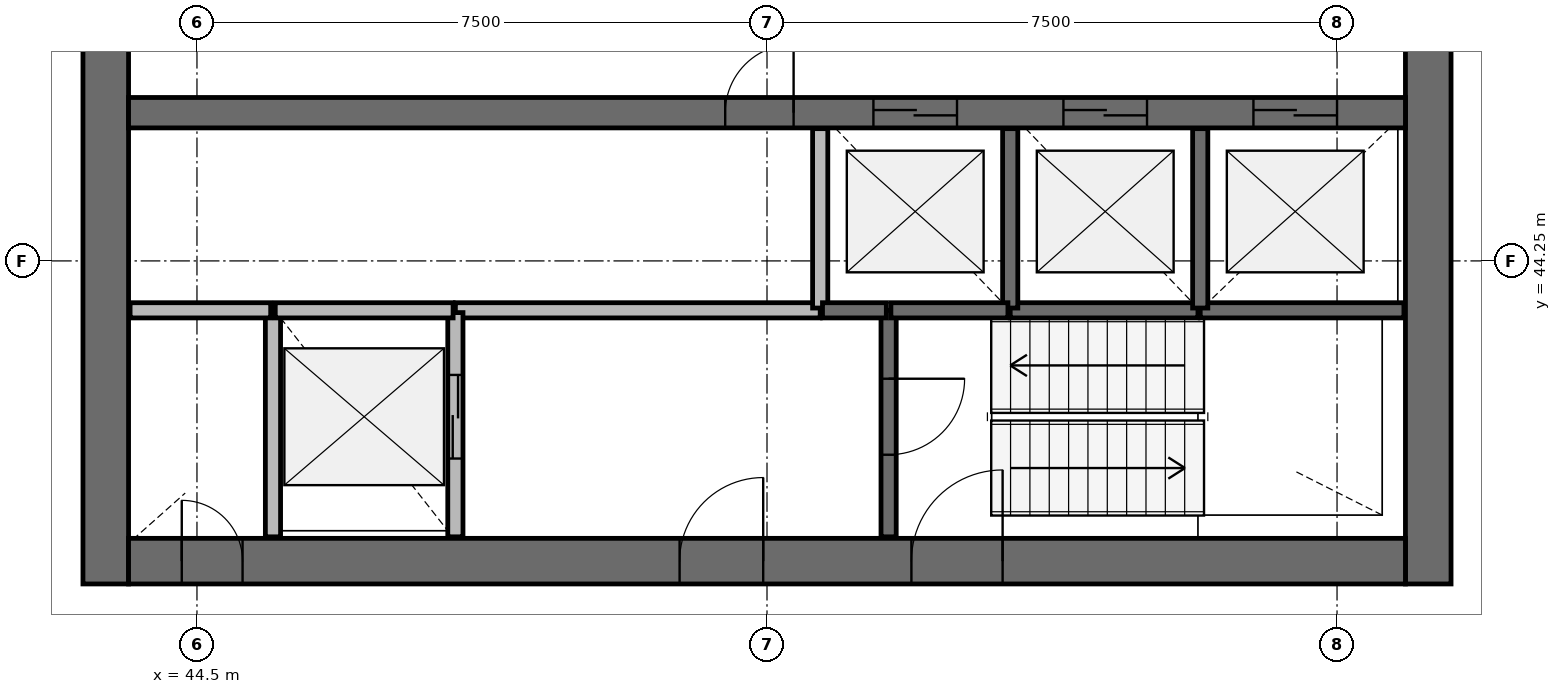
"""IFC4 building model, lengths in metres.
Left out: names, types, materials, properties, quantities, classifications, styles, units other than length and angle.
Written with IfcOpenShell. Run it as: python <this file> out.ifc"""

import sys

from ifc_helpers import new_model, si_unit, direction, frame, frame_2d, origin, place, context, subcontext, project, spatial, rectangle, extrude, source, transform, mapped, element, fill, save


model = new_model("IFC4")
c1 = context("Model", 3, precision=1e-05, world=origin(), true_north=direction((0.0, 1.0)))
c2 = subcontext(c1, "Body", "Model", "MODEL_VIEW")
j1 = project(units=[si_unit("LENGTHUNIT", "METRE"), si_unit("PLANEANGLEUNIT", "RADIAN")], contexts=[c1])
p1 = place(None, origin())
s1 = spatial("IfcSite", under=j1, at=p1, CompositionType="ELEMENT")
p2 = place(p1, origin())
s2 = spatial("IfcBuilding", under=s1, at=p2, CompositionType="ELEMENT")
p3 = place(p2, frame((0.0, 0.0, 257.9)))
s3 = spatial("IfcBuildingStorey", under=s2, at=p3, CompositionType="ELEMENT", Elevation=257.9)
p4 = place(p3, frame((60.7, 40.0, 0.0), z_axis=(0.0, 0.0, 1.0), x_axis=(0.0, 1.0, 0.0)))
e1 = element("IfcWall", 1, at=p4, inside=s3, PredefinedType="SHEAR", context=c2, shape_type="SweptSolid", body=[
    extrude(rectangle(XDim=16.0, YDim=0.6, at=frame_2d((8.0, 0.0))), origin(), (0.0, 0.0, 1.0), 3.9),
])
p5 = place(p4, frame((7.1, 0.0, 0.0)))
e2 = element("IfcOpeningElement", 2, at=p5, cuts=e1, PredefinedType="OPENING", context=c2, shape_type="SweptSolid", body=[
    extrude(rectangle(XDim=1.8, YDim=2.1, at=frame_2d((0.9, 1.05))), frame((0.0, 0.31, 0.0), z_axis=(0.0, -1.0, 0.0), x_axis=(1.0, 0.0, 0.0)), (0.0, 0.0, 1.0), 0.62),
])
p6 = place(p3, frame((43.3, 56.0, 0.0), z_axis=(0.0, 0.0, 1.0), x_axis=(0.0, -1.0, 0.0)))
e3 = element("IfcWall", 3, at=p6, inside=s3, PredefinedType="SHEAR", context=c2, shape_type="SweptSolid", body=[
    extrude(rectangle(XDim=16.0, YDim=0.6, at=frame_2d((8.0, 0.0))), origin(), (0.0, 0.0, 1.0), 3.9),
])
p7 = place(p6, frame((7.1, 0.0, 0.0)))
e4 = element("IfcOpeningElement", 4, at=p7, cuts=e3, PredefinedType="OPENING", context=c2, shape_type="SweptSolid", body=[
    extrude(rectangle(XDim=1.8, YDim=2.1, at=frame_2d((0.9, 1.05))), frame((0.0, 0.31, 0.0), z_axis=(0.0, -1.0, 0.0), x_axis=(1.0, 0.0, 0.0)), (0.0, 0.0, 1.0), 0.62),
])
p8 = place(p3, frame((43.6, 40.3, 0.0), z_axis=(0.0, 0.0, 1.0), x_axis=(1.0, 0.0, 0.0)))
e5 = element("IfcWall", 5, at=p8, inside=s3, PredefinedType="SHEAR", context=c2, shape_type="SweptSolid", body=[
    extrude(rectangle(XDim=16.8, YDim=0.6, at=frame_2d((8.4, 0.0))), origin(), (0.0, 0.0, 1.0), 3.9),
])
p9 = place(p8, frame((10.3, 0.0, 0.0)))
e6 = element("IfcOpeningElement", 6, at=p9, cuts=e5, PredefinedType="OPENING", context=c2, shape_type="SweptSolid", body=[
    extrude(rectangle(XDim=1.2, YDim=2.1, at=frame_2d((0.6, 1.05))), frame((0.0, 0.31, 0.0), z_axis=(0.0, -1.0, 0.0), x_axis=(1.0, 0.0, 0.0)), (0.0, 0.0, 1.0), 0.62),
])
p10 = place(p8, frame((7.25, 0.0, 0.0)))
e7 = element("IfcOpeningElement", 7, at=p10, cuts=e5, PredefinedType="OPENING", context=c2, shape_type="SweptSolid", body=[
    extrude(rectangle(XDim=1.1, YDim=2.1, at=frame_2d((0.55, 1.05))), frame((0.0, 0.31, 0.0), z_axis=(0.0, -1.0, 0.0), x_axis=(1.0, 0.0, 0.0)), (0.0, 0.0, 1.0), 0.62),
])
p11 = place(p8, frame((0.7, 0.0, 0.0)))
e8 = element("IfcOpeningElement", 8, at=p11, cuts=e5, PredefinedType="OPENING", context=c2, shape_type="SweptSolid", body=[
    extrude(rectangle(XDim=0.8, YDim=2.1, at=frame_2d((0.4, 1.05))), frame((0.0, 0.31, 0.0), z_axis=(0.0, -1.0, 0.0), x_axis=(1.0, 0.0, 0.0)), (0.0, 0.0, 1.0), 0.62),
])
p12 = place(p3, frame((43.6, 46.2, 0.0), z_axis=(0.0, 0.0, 1.0), x_axis=(1.0, 0.0, 0.0)))
e9 = element("IfcWall", 9, at=p12, inside=s3, PredefinedType="SHEAR", context=c2, shape_type="SweptSolid", body=[
    extrude(rectangle(XDim=16.8, YDim=0.4, at=frame_2d((8.4, 0.0))), origin(), (0.0, 0.0, 1.0), 3.9),
])
p13 = place(p12, frame((9.8, 0.0, 0.0)))
e10 = element("IfcOpeningElement", 10, at=p13, cuts=e9, PredefinedType="OPENING", context=c2, shape_type="SweptSolid", body=[
    extrude(rectangle(XDim=1.1, YDim=2.1, at=frame_2d((0.55, 1.05))), frame((0.0, 0.21, 0.0), z_axis=(0.0, -1.0, 0.0), x_axis=(1.0, 0.0, 0.0)), (0.0, 0.0, 1.0), 0.42),
])
p14 = place(p12, frame((12.3, 0.0, 0.0)))
e11 = element("IfcOpeningElement", 11, at=p14, cuts=e9, PredefinedType="OPENING", context=c2, shape_type="SweptSolid", body=[
    extrude(rectangle(XDim=1.1, YDim=2.1, at=frame_2d((0.55, 1.05))), frame((0.0, 0.21, 0.0), z_axis=(0.0, -1.0, 0.0), x_axis=(1.0, 0.0, 0.0)), (0.0, 0.0, 1.0), 0.42),
])
p15 = place(p12, frame((14.8, 0.0, 0.0)))
e12 = element("IfcOpeningElement", 12, at=p15, cuts=e9, PredefinedType="OPENING", context=c2, shape_type="SweptSolid", body=[
    extrude(rectangle(XDim=1.1, YDim=2.1, at=frame_2d((0.55, 1.05))), frame((0.0, 0.21, 0.0), z_axis=(0.0, -1.0, 0.0), x_axis=(1.0, 0.0, 0.0)), (0.0, 0.0, 1.0), 0.42),
])
p16 = place(p12, frame((7.85, 0.0, 0.0)))
e13 = element("IfcOpeningElement", 13, at=p16, cuts=e9, PredefinedType="OPENING", context=c2, shape_type="SweptSolid", body=[
    extrude(rectangle(XDim=0.9, YDim=2.1, at=frame_2d((0.45, 1.05))), frame((0.0, 0.21, 0.0), z_axis=(0.0, -1.0, 0.0), x_axis=(1.0, 0.0, 0.0)), (0.0, 0.0, 1.0), 0.42),
])
p17 = place(p3, frame((52.7, 43.6, 0.0), z_axis=(0.0, 0.0, 1.0), x_axis=(-1.0, 0.0, 0.0)))
e14 = element("IfcWall", 14, at=p17, inside=s3, PredefinedType="SOLIDWALL", context=c2, shape_type="SweptSolid", body=[
    extrude(rectangle(XDim=4.8, YDim=0.2, at=frame_2d((2.4, 0.0))), origin(), (0.0, 0.0, 1.0), 3.58),
])
p18 = place(p3, frame((45.5, 43.6, 0.0), z_axis=(0.0, 0.0, 1.0), x_axis=(0.0, -1.0, 0.0)))
e15 = element("IfcWall", 15, at=p18, inside=s3, PredefinedType="SOLIDWALL", context=c2, shape_type="SweptSolid", body=[
    extrude(rectangle(XDim=2.98, YDim=0.2, at=frame_2d((1.49, 0.0))), origin(), (0.0, 0.0, 1.0), 3.58),
])
p19 = place(p3, frame((47.9, 40.62, 0.0), z_axis=(0.0, 0.0, 1.0), x_axis=(0.0, 1.0, 0.0)))
e16 = element("IfcWall", 16, at=p19, inside=s3, PredefinedType="SOLIDWALL", context=c2, shape_type="SweptSolid", body=[
    extrude(rectangle(XDim=2.95, YDim=0.2, at=frame_2d((1.475, 0.0))), origin(), (0.0, 0.0, 1.0), 3.58),
])
p20 = place(p19, frame((1.03, 0.0, 0.0)))
e17 = element("IfcOpeningElement", 17, at=p20, cuts=e16, PredefinedType="OPENING", context=c2, shape_type="SweptSolid", body=[
    extrude(rectangle(XDim=1.1, YDim=2.1, at=frame_2d((0.55, 1.05))), frame((0.0, 0.11, 0.0), z_axis=(0.0, -1.0, 0.0), x_axis=(1.0, 0.0, 0.0)), (0.0, 0.0, 1.0), 0.22),
])
p21 = place(p3, frame((53.6, 43.6, 0.0), z_axis=(0.0, 0.0, 1.0), x_axis=(0.0, -1.0, 0.0)))
e18 = element("IfcWall", 18, at=p21, inside=s3, PredefinedType="SOLIDWALL", context=c2, shape_type="SweptSolid", body=[
    extrude(rectangle(XDim=2.98, YDim=0.2, at=frame_2d((1.49, 0.0))), origin(), (0.0, 0.0, 1.0), 3.58),
])
p22 = place(p21, frame((0.9, 0.0, 0.0)))
e19 = element("IfcOpeningElement", 19, at=p22, cuts=e18, PredefinedType="OPENING", context=c2, shape_type="SweptSolid", body=[
    extrude(rectangle(XDim=1.0, YDim=2.1, at=frame_2d((0.5, 1.05))), frame((0.0, 0.11, 0.0), z_axis=(0.0, -1.0, 0.0), x_axis=(1.0, 0.0, 0.0)), (0.0, 0.0, 1.0), 0.22),
])
p23 = place(p3, frame((57.7, 43.6, 0.0), z_axis=(0.0, 0.0, 1.0), x_axis=(1.0, 0.0, 0.0)))
e20 = element("IfcWall", 20, at=p23, inside=s3, PredefinedType="SOLIDWALL", context=c2, shape_type="SweptSolid", body=[
    extrude(rectangle(XDim=2.68, YDim=0.2, at=frame_2d((1.34, 0.0))), origin(), (0.0, 0.0, 1.0), 3.58),
])
p24 = place(p3, frame((55.2, 43.6, 0.0), z_axis=(0.0, 0.0, 1.0), x_axis=(1.0, 0.0, 0.0)))
e21 = element("IfcWall", 21, at=p24, inside=s3, PredefinedType="SOLIDWALL", context=c2, shape_type="SweptSolid", body=[
    extrude(rectangle(XDim=2.47, YDim=0.2, at=frame_2d((1.235, 0.0))), origin(), (0.0, 0.0, 1.0), 3.58),
])
p25 = place(p3, frame((47.87, 43.6, 0.0), z_axis=(0.0, 0.0, 1.0), x_axis=(-1.0, 0.0, 0.0)))
e22 = element("IfcWall", 22, at=p25, inside=s3, PredefinedType="SOLIDWALL", context=c2, shape_type="SweptSolid", body=[
    extrude(rectangle(XDim=2.34, YDim=0.2, at=frame_2d((1.17, 0.0))), origin(), (0.0, 0.0, 1.0), 3.58),
])
for number, where, z_axis, x_axis in (
    (23, (52.7, 45.99, 0.0), (0.0, 0.0, 1.0), (0.0, -1.0, 0.0)),
    (24, (55.2, 43.63, 0.0), (0.0, 0.0, 1.0), (0.0, 1.0, 0.0)),
    (25, (57.7, 43.63, 0.0), (0.0, 0.0, 1.0), (0.0, 1.0, 0.0)),
):
    element("IfcWall", number, at=place(p3, frame(where, z_axis=z_axis, x_axis=x_axis)), inside=s3, PredefinedType="SOLIDWALL", context=c2, shape_type="SweptSolid", body=[
        extrude(rectangle(XDim=2.36, YDim=0.2, at=frame_2d((1.18, 0.0))), origin(), (0.0, 0.0, 1.0), 3.58),
    ])
p26 = place(p3, frame((45.47, 43.6, 0.0), z_axis=(0.0, 0.0, 1.0), x_axis=(-1.0, 0.0, 0.0)))
e26 = element("IfcWall", 26, at=p26, inside=s3, PredefinedType="SOLIDWALL", context=c2, shape_type="SweptSolid", body=[
    extrude(rectangle(XDim=1.85, YDim=0.2, at=frame_2d((0.925, 0.0))), origin(), (0.0, 0.0, 1.0), 3.58),
])
p27 = place(p3, frame((53.63, 43.6, 0.0), z_axis=(0.0, 0.0, 1.0), x_axis=(1.0, 0.0, 0.0)))
e27 = element("IfcWall", 27, at=p27, inside=s3, PredefinedType="SOLIDWALL", context=c2, shape_type="SweptSolid", body=[
    extrude(rectangle(XDim=1.54, YDim=0.2, at=frame_2d((0.77, 0.0))), origin(), (0.0, 0.0, 1.0), 3.58),
])
p28 = place(p3, frame((52.73, 43.6, 0.0), z_axis=(0.0, 0.0, 1.0), x_axis=(1.0, 0.0, 0.0)))
e28 = element("IfcWall", 28, at=p28, inside=s3, PredefinedType="SOLIDWALL", context=c2, shape_type="SweptSolid", body=[
    extrude(rectangle(XDim=0.84, YDim=0.2, at=frame_2d((0.42, 0.0))), origin(), (0.0, 0.0, 1.0), 3.58),
])
m1 = source(origin(), c2, "Body", "SweptSolid", [
    extrude(rectangle(XDim=1.1, YDim=2.1, at=frame_2d((0.55, 1.05))), frame((0.0, 0.025, 0.0), z_axis=(0.0, -1.0, 0.0), x_axis=(1.0, 0.0, 0.0)), (0.0, 0.0, 1.0), 0.05),
])
p29 = place(p13, origin())
e29 = element("IfcDoor", 29, at=p29, inside=s3, OperationType="DOUBLE_DOOR_SLIDING", PredefinedType="USERDEFINED", context=c2, shape_type="MappedRepresentation", body=[
    mapped(m1, transform((0.0, 0.0, 0.0), scale=1.0)),
])
fill(e10, e29)
p30 = place(p14, origin())
e30 = element("IfcDoor", 30, at=p30, inside=s3, OperationType="DOUBLE_DOOR_SLIDING", PredefinedType="USERDEFINED", context=c2, shape_type="MappedRepresentation", body=[
    mapped(m1, transform((0.0, 0.0, 0.0), scale=1.0)),
])
fill(e11, e30)
p31 = place(p15, origin())
e31 = element("IfcDoor", 31, at=p31, inside=s3, OperationType="DOUBLE_DOOR_SLIDING", PredefinedType="USERDEFINED", context=c2, shape_type="MappedRepresentation", body=[
    mapped(m1, transform((0.0, 0.0, 0.0), scale=1.0)),
])
fill(e12, e31)
p32 = place(p20, origin())
e32 = element("IfcDoor", 32, at=p32, inside=s3, OperationType="DOUBLE_DOOR_SLIDING", PredefinedType="USERDEFINED", context=c2, shape_type="MappedRepresentation", body=[
    mapped(m1, transform((0.0, 0.0, 0.0), scale=1.0)),
])
fill(e17, e32)
m2 = source(origin(), c2, "Body", "SweptSolid", [
    extrude(rectangle(XDim=1.2, YDim=2.1, at=frame_2d((0.6, 1.05))), frame((0.0, 0.025, 0.0), z_axis=(0.0, -1.0, 0.0), x_axis=(1.0, 0.0, 0.0)), (0.0, 0.0, 1.0), 0.05),
])
p33 = place(p9, origin())
e33 = element("IfcDoor", 33, at=p33, inside=s3, OperationType="SINGLE_SWING_RIGHT", PredefinedType="DOOR", context=c2, shape_type="MappedRepresentation", body=[
    mapped(m2, transform((0.0, 0.0, 0.0), scale=1.0)),
])
fill(e6, e33)
m3 = source(origin(), c2, "Body", "SweptSolid", [
    extrude(rectangle(XDim=1.0, YDim=2.1, at=frame_2d((0.5, 1.05))), frame((0.0, 0.025, 0.0), z_axis=(0.0, -1.0, 0.0), x_axis=(1.0, 0.0, 0.0)), (0.0, 0.0, 1.0), 0.05),
])
p34 = place(p22, origin())
e34 = element("IfcDoor", 34, at=p34, inside=s3, OperationType="SINGLE_SWING_LEFT", PredefinedType="DOOR", context=c2, shape_type="MappedRepresentation", body=[
    mapped(m3, transform((0.0, 0.0, 0.0), scale=1.0)),
])
fill(e19, e34)
m4 = source(origin(), c2, "Body", "SweptSolid", [
    extrude(rectangle(XDim=1.1, YDim=2.1, at=frame_2d((0.55, 1.05))), frame((0.0, 0.025, 0.0), z_axis=(0.0, -1.0, 0.0), x_axis=(1.0, 0.0, 0.0)), (0.0, 0.0, 1.0), 0.05),
])
p35 = place(p10, origin())
e35 = element("IfcDoor", 35, at=p35, inside=s3, OperationType="SINGLE_SWING_RIGHT", PredefinedType="DOOR", context=c2, shape_type="MappedRepresentation", body=[
    mapped(m4, transform((0.0, 0.0, 0.0), scale=1.0)),
])
fill(e7, e35)
m5 = source(origin(), c2, "Body", "SweptSolid", [
    extrude(rectangle(XDim=0.8, YDim=2.1, at=frame_2d((0.4, 1.05))), frame((0.0, 0.025, 0.0), z_axis=(0.0, -1.0, 0.0), x_axis=(1.0, 0.0, 0.0)), (0.0, 0.0, 1.0), 0.05),
])
p36 = place(p11, origin())
e36 = element("IfcDoor", 36, at=p36, inside=s3, OperationType="SINGLE_SWING_LEFT", PredefinedType="DOOR", context=c2, shape_type="MappedRepresentation", body=[
    mapped(m5, transform((0.0, 0.0, 0.0), scale=1.0)),
])
fill(e8, e36)
m6 = source(origin(), c2, "Body", "SweptSolid", [
    extrude(rectangle(XDim=0.9, YDim=2.1, at=frame_2d((0.45, 1.05))), frame((0.0, 0.025, 0.0), z_axis=(0.0, -1.0, 0.0), x_axis=(1.0, 0.0, 0.0)), (0.0, 0.0, 1.0), 0.05),
])
p37 = place(p16, origin())
e37 = element("IfcDoor", 37, at=p37, inside=s3, OperationType="SINGLE_SWING_RIGHT", PredefinedType="DOOR", context=c2, shape_type="MappedRepresentation", body=[
    mapped(m6, transform((0.0, 0.0, 0.0), scale=1.0)),
])
fill(e13, e37)
save(model, sys.argv[1])
